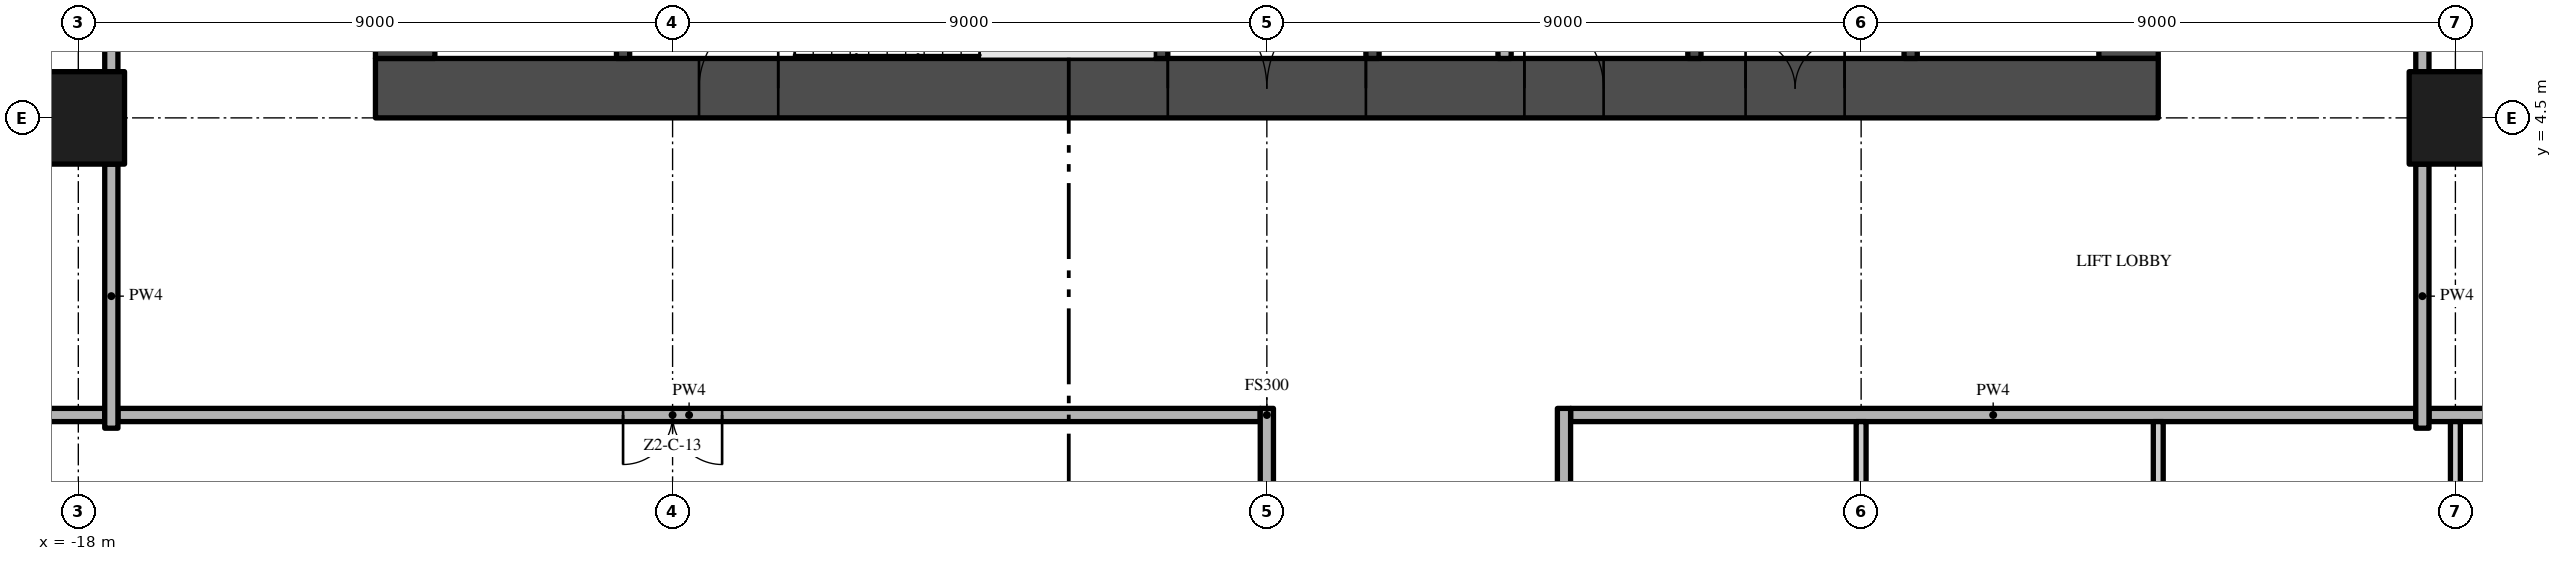
"""IFC4 building model, lengths in metres.
Left out: names, types, materials, properties, quantities, classifications, styles, units other than length and angle.
Written with IfcOpenShell. Run it as: python <this file> out.ifc"""

import sys

from ifc_helpers import new_model, si_unit, direction, frame, frame_2d, origin, origin_2d, place, context, subcontext, project, spatial, rectangle, extrude, element, fill, save


model = new_model("IFC4")
c1 = context("Model", 3, precision=1e-05, world=origin(), true_north=direction((0.0, 1.0)))
c2 = subcontext(c1, "Body", "Model", "MODEL_VIEW")
j1 = project(units=[si_unit("LENGTHUNIT", "METRE"), si_unit("PLANEANGLEUNIT", "RADIAN")], contexts=[c1])
p1 = place(None, origin())
s1 = spatial("IfcSite", under=j1, at=p1, CompositionType="ELEMENT")
p2 = place(p1, origin())
s2 = spatial("IfcBuilding", under=s1, at=p2, CompositionType="ELEMENT")
p3 = place(p2, frame((0.0, 0.0, 92.2)))
s3 = spatial("IfcBuildingStorey", under=s2, at=p3, CompositionType="ELEMENT", Elevation=92.2)
p4 = place(p3, frame((-13.5, 4.95, -0.3), z_axis=(0.0, 0.0, 1.0), x_axis=(1.0, 0.0, 0.0)))
e1 = element("IfcWall", 1, at=p4, inside=s3, PredefinedType="SHEAR", context=c2, shape_type="SweptSolid", body=[
    extrude(rectangle(XDim=27.0, YDim=0.9, at=frame_2d((13.5, 0.0))), origin(), (0.0, 0.0, 1.0), 3.8),
])
p5 = place(p4, frame((12.0, 0.0, 0.3)))
e2 = element("IfcOpeningElement", 2, at=p5, cuts=e1, PredefinedType="OPENING", context=c2, shape_type="SweptSolid", body=[
    extrude(rectangle(XDim=3.0, YDim=2.4, at=frame_2d((1.5, 1.2))), frame((0.0, 0.46, 0.0), z_axis=(0.0, -1.0, 0.0), x_axis=(1.0, 0.0, 0.0)), (0.0, 0.0, 1.0), 0.92),
])
p6 = place(p4, frame((4.9, 0.0, 0.3)))
e3 = element("IfcOpeningElement", 3, at=p6, cuts=e1, PredefinedType="OPENING", context=c2, shape_type="SweptSolid", body=[
    extrude(rectangle(XDim=1.2, YDim=2.2, at=frame_2d((0.6, 1.1))), frame((0.0, 0.46, 0.0), z_axis=(0.0, -1.0, 0.0), x_axis=(1.0, 0.0, 0.0)), (0.0, 0.0, 1.0), 0.92),
])
p7 = place(p4, frame((20.75, 0.0, 0.3)))
e4 = element("IfcOpeningElement", 4, at=p7, cuts=e1, PredefinedType="OPENING", context=c2, shape_type="SweptSolid", body=[
    extrude(rectangle(XDim=1.5, YDim=2.2, at=frame_2d((0.75, 1.1))), frame((0.0, 0.46, 0.0), z_axis=(0.0, -1.0, 0.0), x_axis=(1.0, 0.0, 0.0)), (0.0, 0.0, 1.0), 0.92),
])
p8 = place(p4, frame((17.4, 0.0, 0.3)))
e5 = element("IfcOpeningElement", 5, at=p8, cuts=e1, PredefinedType="OPENING", context=c2, shape_type="SweptSolid", body=[
    extrude(rectangle(XDim=1.2, YDim=2.2, at=frame_2d((0.6, 1.1))), frame((0.0, 0.46, 0.0), z_axis=(0.0, -1.0, 0.0), x_axis=(1.0, 0.0, 0.0)), (0.0, 0.0, 1.0), 0.92),
])
p9 = place(p3, frame((13.05, 5.4, -0.3), z_axis=(0.0, 0.0, 1.0), x_axis=(0.0, 1.0, 0.0)))
e6 = element("IfcWall", 6, at=p9, inside=s3, PredefinedType="SHEAR", context=c2, shape_type="SweptSolid", body=[
    extrude(rectangle(XDim=16.2, YDim=0.9, at=frame_2d((8.1, 0.0))), origin(), (0.0, 0.0, 1.0), 3.8),
])
p10 = place(p9, frame((6.0, 0.0, 0.3)))
e7 = element("IfcOpeningElement", 7, at=p10, cuts=e6, PredefinedType="OPENING", context=c2, shape_type="SweptSolid", body=[
    extrude(rectangle(XDim=1.2, YDim=2.2, at=frame_2d((0.6, 1.1))), frame((0.0, 0.46, 0.0), z_axis=(0.0, -1.0, 0.0), x_axis=(1.0, 0.0, 0.0)), (0.0, 0.0, 1.0), 0.92),
])
p11 = place(p3, frame((-13.05, 21.6, -0.3), z_axis=(0.0, 0.0, 1.0), x_axis=(0.0, -1.0, 0.0)))
e8 = element("IfcWall", 8, at=p11, inside=s3, PredefinedType="SHEAR", context=c2, shape_type="SweptSolid", body=[
    extrude(rectangle(XDim=16.2, YDim=0.9, at=frame_2d((8.1, 0.0))), origin(), (0.0, 0.0, 1.0), 3.8),
])
p12 = place(p11, frame((9.0, 0.0, 0.3)))
e9 = element("IfcOpeningElement", 9, at=p12, cuts=e8, PredefinedType="OPENING", context=c2, shape_type="SweptSolid", body=[
    extrude(rectangle(XDim=1.2, YDim=2.2, at=frame_2d((0.6, 1.1))), frame((0.0, 0.46, 0.0), z_axis=(0.0, -1.0, 0.0), x_axis=(1.0, 0.0, 0.0)), (0.0, 0.0, 1.0), 0.92),
])
for number, where, z_axis, x_axis in (
    (10, (-18.0, 4.5, 0.0), (0.0, 0.0, 1.0), (1.0, 0.0, 0.0)),
    (11, (18.0, 4.5, 0.0), (0.0, 0.0, 1.0), (1.0, 0.0, 0.0)),
):
    element("IfcColumn", number, at=place(p3, frame(where, z_axis=z_axis, x_axis=x_axis)), inside=s3, PredefinedType="COLUMN", context=c2, shape_type="SweptSolid", body=[
        extrude(rectangle(XDim=1.4, YDim=1.4, at=origin_2d()), origin(), (0.0, 0.0, 1.0), 3.5),
    ])
for number, where, z_axis, x_axis in (
    (12, (-9.75, 5.4, 0.0), (0.0, 0.0, 1.0), (0.0, 1.0, 0.0)),
    (13, (-1.6, 5.4, 0.0), (0.0, 0.0, 1.0), (0.0, 1.0, 0.0)),
):
    element("IfcWall", number, at=place(p3, frame(where, z_axis=z_axis, x_axis=x_axis)), inside=s3, PredefinedType="SHEAR", context=c2, shape_type="SweptSolid", body=[
        extrude(rectangle(XDim=2.55, YDim=0.2, at=frame_2d((1.275, 0.0))), origin(), (0.0, 0.0, 1.0), 3.5),
    ])
p13 = place(p3, frame((1.6, 13.5, 0.0), z_axis=(0.0, 0.0, 1.0), x_axis=(0.0, -1.0, 0.0)))
e14 = element("IfcWall", 14, at=p13, inside=s3, PredefinedType="SHEAR", context=c2, shape_type="SweptSolid", body=[
    extrude(rectangle(XDim=8.1, YDim=0.2, at=frame_2d((4.05, 0.0))), origin(), (0.0, 0.0, 1.0), 3.5),
])
p14 = place(p13, frame((3.2, 0.0, 0.0)))
e15 = element("IfcOpeningElement", 15, at=p14, cuts=e14, PredefinedType="OPENING", context=c2, shape_type="SweptSolid", body=[
    extrude(rectangle(XDim=0.9, YDim=2.1, at=frame_2d((0.45, 1.05))), frame((0.0, 0.11, 0.0), z_axis=(0.0, -1.0, 0.0), x_axis=(1.0, 0.0, 0.0)), (0.0, 0.0, 1.0), 0.22),
])
p15 = place(p3, frame((3.6, 13.5, 0.0), z_axis=(0.0, 0.0, 1.0), x_axis=(0.0, -1.0, 0.0)))
e16 = element("IfcWall", 16, at=p15, inside=s3, PredefinedType="PARTITIONING", context=c2, shape_type="SweptSolid", body=[
    extrude(rectangle(XDim=8.1, YDim=0.2, at=frame_2d((4.05, 0.0))), origin(), (0.0, 0.0, 1.0), 3.5),
])
p16 = place(p15, frame((3.6, 0.0, 0.0)))
e17 = element("IfcOpeningElement", 17, at=p16, cuts=e16, PredefinedType="OPENING", context=c2, shape_type="SweptSolid", body=[
    extrude(rectangle(XDim=0.9, YDim=2.1, at=frame_2d((0.45, 1.05))), frame((0.0, 0.11, 0.0), z_axis=(0.0, -1.0, 0.0), x_axis=(1.0, 0.0, 0.0)), (0.0, 0.0, 1.0), 0.22),
])
p17 = place(p3, frame((6.475, 5.4, 0.0), z_axis=(0.0, 0.0, 1.0), x_axis=(0.0, 1.0, 0.0)))
e18 = element("IfcWall", 18, at=p17, inside=s3, PredefinedType="SHEAR", context=c2, shape_type="SweptSolid", body=[
    extrude(rectangle(XDim=6.7, YDim=0.2, at=frame_2d((3.35, 0.0))), origin(), (0.0, 0.0, 1.0), 3.5),
])
p18 = place(p3, frame((9.75, 5.4, 0.0), z_axis=(0.0, 0.0, 1.0), x_axis=(0.0, 1.0, 0.0)))
e19 = element("IfcWall", 19, at=p18, inside=s3, PredefinedType="SHEAR", context=c2, shape_type="SweptSolid", body=[
    extrude(rectangle(XDim=2.2, YDim=0.2, at=frame_2d((1.1, 0.0))), origin(), (0.0, 0.0, 1.0), 3.5),
])
p19 = place(p18, frame((0.55, 0.0, 0.0)))
e20 = element("IfcOpeningElement", 20, at=p19, cuts=e19, PredefinedType="OPENING", context=c2, shape_type="SweptSolid", body=[
    extrude(rectangle(XDim=1.1, YDim=2.1, at=frame_2d((0.55, 1.05))), frame((0.0, 0.11, 0.0), z_axis=(0.0, -1.0, 0.0), x_axis=(1.0, 0.0, 0.0)), (0.0, 0.0, 1.0), 0.22),
])
p20 = place(p3, frame((-0.1, 0.0, 0.0), z_axis=(0.0, 0.0, 1.0), x_axis=(-1.0, 0.0, 0.0)))
e21 = element("IfcWall", 21, at=p20, inside=s3, PredefinedType="PARTITIONING", context=c2, shape_type="SweptSolid", body=[
    extrude(rectangle(XDim=17.3, YDim=0.2, at=frame_2d((8.65, 0.0))), origin(), (0.0, 0.0, 1.0), 3.5),
])
p21 = place(p20, frame((8.15, 0.0, 0.0)))
e22 = element("IfcOpeningElement", 22, at=p21, cuts=e21, PredefinedType="OPENING", context=c2, shape_type="SweptSolid", body=[
    extrude(rectangle(XDim=1.5, YDim=2.4, at=frame_2d((0.75, 1.2))), frame((0.0, 0.11, 0.0), z_axis=(0.0, -1.0, 0.0), x_axis=(1.0, 0.0, 0.0)), (0.0, 0.0, 1.0), 0.22),
])
p22 = place(p3, frame((4.6, 0.0, 0.0), z_axis=(0.0, 0.0, 1.0), x_axis=(1.0, 0.0, 0.0)))
e23 = element("IfcWall", 23, at=p22, inside=s3, PredefinedType="PARTITIONING", context=c2, shape_type="SweptSolid", body=[
    extrude(rectangle(XDim=12.8, YDim=0.2, at=frame_2d((6.4, 0.0))), origin(), (0.0, 0.0, 1.0), 3.5),
])
for number, where, z_axis, x_axis in (
    (24, (-26.7, 0.0, 0.0), (0.0, 0.0, 1.0), (1.0, 0.0, 0.0)),
    (25, (17.6, 0.0, 0.0), (0.0, 0.0, 1.0), (1.0, 0.0, 0.0)),
):
    element("IfcWall", number, at=place(p3, frame(where, z_axis=z_axis, x_axis=x_axis)), inside=s3, PredefinedType="PARTITIONING", context=c2, shape_type="SweptSolid", body=[
        extrude(rectangle(XDim=9.1, YDim=0.2, at=frame_2d((4.55, 0.0))), origin(), (0.0, 0.0, 1.0), 3.5),
    ])
p23 = place(p3, frame((-17.5, -0.2, 0.0), z_axis=(0.0, 0.0, 1.0), x_axis=(0.0, 1.0, 0.0)))
e26 = element("IfcWall", 26, at=p23, inside=s3, PredefinedType="PARTITIONING", context=c2, shape_type="SweptSolid", body=[
    extrude(rectangle(XDim=4.0, YDim=0.2, at=frame_2d((2.0, 0.0))), origin(), (0.0, 0.0, 1.0), 3.5),
])
p24 = place(p3, frame((-17.5, 5.2, 0.0), z_axis=(0.0, 0.0, 1.0), x_axis=(0.0, 1.0, 0.0)))
e27 = element("IfcWall", 27, at=p24, inside=s3, PredefinedType="PARTITIONING", context=c2, shape_type="SweptSolid", body=[
    extrude(rectangle(XDim=7.6, YDim=0.2, at=frame_2d((3.8, 0.0))), origin(), (0.0, 0.0, 1.0), 3.5),
])
p25 = place(p3, frame((0.0, -3.8, 0.0), z_axis=(0.0, 0.0, 1.0), x_axis=(0.0, 1.0, 0.0)))
e28 = element("IfcWall", 28, at=p25, inside=s3, PredefinedType="PARTITIONING", context=c2, shape_type="SweptSolid", body=[
    extrude(rectangle(XDim=3.9, YDim=0.2, at=frame_2d((1.95, 0.0))), origin(), (0.0, 0.0, 1.0), 3.5),
])
p26 = place(p3, frame((4.5, 0.1, 0.0), z_axis=(0.0, 0.0, 1.0), x_axis=(0.0, -1.0, 0.0)))
e29 = element("IfcWall", 29, at=p26, inside=s3, PredefinedType="PARTITIONING", context=c2, shape_type="SweptSolid", body=[
    extrude(rectangle(XDim=22.3, YDim=0.2, at=frame_2d((11.15, 0.0))), origin(), (0.0, 0.0, 1.0), 3.5),
])
p27 = place(p26, frame((10.6, 0.0, 0.0)))
e30 = element("IfcOpeningElement", 30, at=p27, cuts=e29, PredefinedType="OPENING", context=c2, shape_type="SweptSolid", body=[
    extrude(rectangle(XDim=1.5, YDim=2.4, at=frame_2d((0.75, 1.2))), frame((0.0, 0.11, 0.0), z_axis=(0.0, -1.0, 0.0), x_axis=(1.0, 0.0, 0.0)), (0.0, 0.0, 1.0), 0.22),
])
p28 = place(p3, frame((9.0, -0.1, 0.0), z_axis=(0.0, 0.0, 1.0), x_axis=(0.0, -1.0, 0.0)))
e31 = element("IfcWall", 31, at=p28, inside=s3, PredefinedType="PARTITIONING", context=c2, shape_type="SweptSolid", body=[
    extrude(rectangle(XDim=3.7, YDim=0.15, at=frame_2d((1.85, 0.0))), origin(), (0.0, 0.0, 1.0), 3.5),
])
p29 = place(p28, frame((2.4, 0.0, 0.0)))
e32 = element("IfcOpeningElement", 32, at=p29, cuts=e31, PredefinedType="OPENING", context=c2, shape_type="SweptSolid", body=[
    extrude(rectangle(XDim=1.0, YDim=2.4, at=frame_2d((0.5, 1.2))), frame((0.0, 0.085, 0.0), z_axis=(0.0, -1.0, 0.0), x_axis=(1.0, 0.0, 0.0)), (0.0, 0.0, 1.0), 0.17),
])
p30 = place(p3, frame((13.5, -8.325, 0.0), z_axis=(0.0, 0.0, 1.0), x_axis=(0.0, 1.0, 0.0)))
e33 = element("IfcWall", 33, at=p30, inside=s3, PredefinedType="PARTITIONING", context=c2, shape_type="SweptSolid", body=[
    extrude(rectangle(XDim=8.225, YDim=0.15, at=frame_2d((4.112, 0.0))), origin(), (0.0, 0.0, 1.0), 3.5),
])
p31 = place(p3, frame((17.5, -0.2, 0.0), z_axis=(0.0, 0.0, 1.0), x_axis=(0.0, 1.0, 0.0)))
e34 = element("IfcWall", 34, at=p31, inside=s3, PredefinedType="PARTITIONING", context=c2, shape_type="SweptSolid", body=[
    extrude(rectangle(XDim=4.0, YDim=0.2, at=frame_2d((2.0, 0.0))), origin(), (0.0, 0.0, 1.0), 3.5),
])
p32 = place(p3, frame((17.5, 12.8, 0.0), z_axis=(0.0, 0.0, 1.0), x_axis=(0.0, -1.0, 0.0)))
e35 = element("IfcWall", 35, at=p32, inside=s3, PredefinedType="PARTITIONING", context=c2, shape_type="SweptSolid", body=[
    extrude(rectangle(XDim=7.6, YDim=0.2, at=frame_2d((3.8, 0.0))), origin(), (0.0, 0.0, 1.0), 3.5),
])
p33 = place(p32, frame((5.45, 0.0, 0.0)))
e36 = element("IfcOpeningElement", 36, at=p33, cuts=e35, PredefinedType="OPENING", context=c2, shape_type="SweptSolid", body=[
    extrude(rectangle(XDim=1.2, YDim=2.4, at=frame_2d((0.6, 1.2))), frame((0.0, 0.11, 0.0), z_axis=(0.0, -1.0, 0.0), x_axis=(1.0, 0.0, 0.0)), (0.0, 0.0, 1.0), 0.22),
])
p34 = place(p3, frame((18.0, -3.8, 0.0), z_axis=(0.0, 0.0, 1.0), x_axis=(0.0, 1.0, 0.0)))
e37 = element("IfcWall", 37, at=p34, inside=s3, PredefinedType="PARTITIONING", context=c2, shape_type="SweptSolid", body=[
    extrude(rectangle(XDim=3.7, YDim=0.15, at=frame_2d((1.85, 0.0))), origin(), (0.0, 0.0, 1.0), 3.5),
])
p35 = place(p5, frame((3.0, 0.0, 0.0), z_axis=(0.0, 0.0, 1.0), x_axis=(-1.0, 0.0, 0.0)))
e38 = element("IfcDoor", 38, at=p35, inside=s3, OperationType="DOUBLE_DOOR_SINGLE_SWING", PredefinedType="DOOR", context=c2, shape_type="SweptSolid", body=[
    extrude(rectangle(XDim=3.0, YDim=2.4, at=frame_2d((1.5, 1.2))), frame((0.0, 0.025, 0.0), z_axis=(0.0, -1.0, 0.0), x_axis=(1.0, 0.0, 0.0)), (0.0, 0.0, 1.0), 0.05),
])
fill(e2, e38)
p36 = place(p6, frame((1.2, 0.0, 0.0), z_axis=(0.0, 0.0, 1.0), x_axis=(-1.0, 0.0, 0.0)))
e39 = element("IfcDoor", 39, at=p36, inside=s3, OperationType="SINGLE_SWING_LEFT", PredefinedType="DOOR", context=c2, shape_type="SweptSolid", body=[
    extrude(rectangle(XDim=1.2, YDim=2.2, at=frame_2d((0.6, 1.1))), frame((0.0, 0.025, 0.0), z_axis=(0.0, -1.0, 0.0), x_axis=(1.0, 0.0, 0.0)), (0.0, 0.0, 1.0), 0.05),
])
fill(e3, e39)
p37 = place(p7, frame((1.5, 0.0, 0.0), z_axis=(0.0, 0.0, 1.0), x_axis=(-1.0, 0.0, 0.0)))
e40 = element("IfcDoor", 40, at=p37, inside=s3, OperationType="DOUBLE_DOOR_SINGLE_SWING", PredefinedType="DOOR", context=c2, shape_type="SweptSolid", body=[
    extrude(rectangle(XDim=1.5, YDim=2.2, at=frame_2d((0.75, 1.1))), frame((0.0, 0.025, 0.0), z_axis=(0.0, -1.0, 0.0), x_axis=(1.0, 0.0, 0.0)), (0.0, 0.0, 1.0), 0.05),
])
fill(e4, e40)
p38 = place(p8, frame((1.2, 0.0, 0.0), z_axis=(0.0, 0.0, 1.0), x_axis=(-1.0, 0.0, 0.0)))
e41 = element("IfcDoor", 41, at=p38, inside=s3, OperationType="SINGLE_SWING_RIGHT", PredefinedType="DOOR", context=c2, shape_type="SweptSolid", body=[
    extrude(rectangle(XDim=1.2, YDim=2.2, at=frame_2d((0.6, 1.1))), frame((0.0, 0.025, 0.0), z_axis=(0.0, -1.0, 0.0), x_axis=(1.0, 0.0, 0.0)), (0.0, 0.0, 1.0), 0.05),
])
fill(e5, e41)
p39 = place(p21, origin())
e42 = element("IfcDoor", 42, at=p39, inside=s3, OperationType="DOUBLE_DOOR_SINGLE_SWING", PredefinedType="DOOR", context=c2, shape_type="SweptSolid", body=[
    extrude(rectangle(XDim=1.5, YDim=2.4, at=frame_2d((0.75, 1.2))), frame((0.0, 0.025, 0.0), z_axis=(0.0, -1.0, 0.0), x_axis=(1.0, 0.0, 0.0)), (0.0, 0.0, 1.0), 0.05),
])
fill(e22, e42)
save(model, sys.argv[1])
